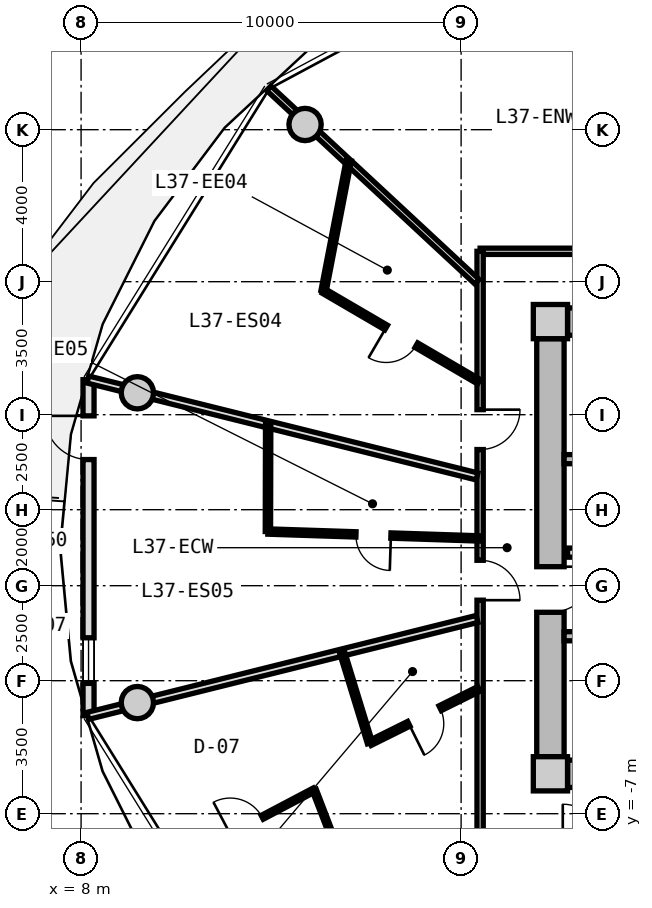
"""IFC4 building model, lengths in metres.
Left out: names, types, materials, properties, quantities, classifications, styles, units other than length and angle.
Written with IfcOpenShell. Run it as: python <this file> out.ifc"""

import sys

from ifc_helpers import new_model, si_unit, direction, frame, frame_2d, origin, origin_2d, place, context, subcontext, project, spatial, rectangle, circle, extrude, source, transform, mapped, element, fill, save


model = new_model("IFC4")
c1 = context("Model", 3, precision=1e-05, world=origin(), true_north=direction((0.0, 1.0)))
c2 = subcontext(c1, "Body", "Model", "MODEL_VIEW")
j1 = project(units=[si_unit("LENGTHUNIT", "METRE"), si_unit("PLANEANGLEUNIT", "RADIAN")], contexts=[c1])
p1 = place(None, origin())
s1 = spatial("IfcSite", under=j1, at=p1, CompositionType="ELEMENT")
p2 = place(p1, origin())
s2 = spatial("IfcBuilding", under=s1, at=p2, CompositionType="ELEMENT")
p3 = place(p2, frame((0.0, 0.0, 120.65)))
s3 = spatial("IfcBuildingStorey", under=s2, at=p3, CompositionType="ELEMENT", Elevation=120.65)
m1 = source(origin(), c2, "Body", "SweptSolid", [
    extrude(rectangle(XDim=0.9, YDim=0.9, at=origin_2d()), origin(), (0.0, 0.0, 1.0), 3.05),
])
for number, where, z_axis, x_axis in (
    (1, (20.35, -5.95, 0.0), (0.0, 0.0, 1.0), (1.0, 0.0, 0.0)),
    (2, (20.35, 5.95, 0.0), (0.0, 0.0, 1.0), (1.0, 0.0, 0.0)),
):
    element("IfcColumn", number, at=place(p3, frame(where, z_axis=z_axis, x_axis=x_axis)), inside=s3, PredefinedType="COLUMN", context=c2, shape_type="MappedRepresentation", body=[
        mapped(m1, transform((0.0, 0.0, 0.0), x_axis=(1.0, 0.0, 0.0), y_axis=(0.0, 1.0, 0.0), z_axis=(0.0, 0.0, 1.0), scale=1.0)),
    ])
m2 = source(origin(), c2, "Body", "SweptSolid", [
    extrude(rectangle(XDim=14.4, YDim=0.72, at=frame_2d((7.2, 0.0))), origin(), (0.0, 0.0, 1.0), 2.79),
])
for number, where, z_axis, x_axis in (
    (3, (20.8, 5.95, 0.0), (0.0, 0.0, 1.0), (1.0, 0.0, 0.0)),
    (4, (35.2, -5.95, 0.0), (0.0, 0.0, 1.0), (-1.0, 0.0, 0.0)),
):
    element("IfcWall", number, at=place(p3, frame(where, z_axis=z_axis, x_axis=x_axis)), inside=s3, PredefinedType="SHEAR", context=c2, shape_type="MappedRepresentation", body=[
        mapped(m2, transform((0.0, 0.0, 0.0), x_axis=(1.0, 0.0, 0.0), y_axis=(0.0, 1.0, 0.0), z_axis=(0.0, 0.0, 1.0), scale=1.0)),
    ])
m3 = source(origin(), c2, "Body", "SweptSolid", [
    extrude(rectangle(XDim=11.0, YDim=0.72, at=frame_2d((5.5, 0.0))), origin(), (0.0, 0.0, 1.0), 2.79),
])
p4 = place(p3, frame((20.35, -5.5, 0.0), z_axis=(0.0, 0.0, 1.0), x_axis=(0.0, 1.0, 0.0)))
e5 = element("IfcWall", 5, at=p4, inside=s3, PredefinedType="SHEAR", context=c2, shape_type="MappedRepresentation", body=[
    mapped(m3, transform((0.0, 0.0, 0.0), x_axis=(1.0, 0.0, 0.0), y_axis=(0.0, 1.0, 0.0), z_axis=(0.0, 0.0, 1.0), scale=1.0)),
])
p5 = place(p4, frame((3.8, 0.0, 0.0)))
e6 = element("IfcOpeningElement", 6, at=p5, cuts=e5, PredefinedType="OPENING", context=c2, shape_type="SweptSolid", body=[
    extrude(rectangle(XDim=1.2, YDim=2.15, at=frame_2d((0.6, 1.075))), frame((0.0, 0.37, 0.0), z_axis=(0.0, -1.0, 0.0), x_axis=(1.0, 0.0, 0.0)), (0.0, 0.0, 1.0), 0.74),
])
m4 = source(origin(), c2, "Body", "SweptSolid", [
    extrude(circle(Radius=0.425, at=origin_2d()), origin(), (0.0, 0.0, 1.0), 3.05),
])
for number, where, z_axis, x_axis in (
    (7, (13.894, 11.137, 0.0), (0.0, 0.0, 1.0), (1.0, 0.0, 0.0)),
    (8, (9.481, 4.076, 0.0), (0.0, 0.0, 1.0), (1.0, 0.0, 0.0)),
    (9, (9.481, -4.076, 0.0), (0.0, 0.0, 1.0), (1.0, 0.0, 0.0)),
):
    element("IfcColumn", number, at=place(p3, frame(where, z_axis=z_axis, x_axis=x_axis)), inside=s3, PredefinedType="COLUMN", context=c2, shape_type="MappedRepresentation", body=[
        mapped(m4, transform((0.0, 0.0, 0.0), x_axis=(1.0, 0.0, 0.0), y_axis=(0.0, 1.0, 0.0), z_axis=(0.0, 0.0, 1.0), scale=1.0)),
    ])
m5 = source(origin(), c2, "Body", "SweptSolid", [
    extrude(rectangle(XDim=8.841, YDim=0.29, at=frame_2d((4.421, 0.0))), origin(), (0.0, 0.0, 1.0), 2.79),
])
p6 = place(p3, frame((8.196, -4.421, 0.0), z_axis=(0.0, 0.0, 1.0), x_axis=(0.0, 1.0, 0.0)))
e10 = element("IfcWall", 10, at=p6, inside=s3, PredefinedType="SOLIDWALL", context=c2, shape_type="MappedRepresentation", body=[
    mapped(m5, transform((0.0, 0.0, 0.0), x_axis=(1.0, 0.0, 0.0), y_axis=(0.0, 1.0, 0.0), z_axis=(0.0, 0.0, 1.0), scale=1.0)),
])
p7 = place(p6, frame((6.74, 0.0, 0.0)))
e11 = element("IfcOpeningElement", 11, at=p7, cuts=e10, PredefinedType="OPENING", context=c2, shape_type="SweptSolid", body=[
    extrude(rectangle(XDim=1.15, YDim=2.25, at=frame_2d((0.575, 1.125))), frame((0.0, 0.155, 0.0), z_axis=(0.0, -1.0, 0.0), x_axis=(1.0, 0.0, 0.0)), (0.0, 0.0, 1.0), 0.31),
])
p8 = place(p6, frame((0.85, 0.0, 0.85)))
e12 = element("IfcOpeningElement", 12, at=p8, cuts=e10, PredefinedType="OPENING", context=c2, shape_type="SweptSolid", body=[
    extrude(rectangle(XDim=1.2, YDim=1.5, at=frame_2d((0.6, 0.75))), frame((0.0, 0.155, 0.0), z_axis=(0.0, -1.0, 0.0), x_axis=(1.0, 0.0, 0.0)), (0.0, 0.0, 1.0), 0.31),
])
m6 = source(origin(), c2, "Body", "SweptSolid", [
    extrude(rectangle(XDim=7.83, YDim=0.24, at=frame_2d((3.915, 0.0))), origin(), (0.0, 0.0, 1.0), 2.79),
])
p9 = place(p3, frame((20.71, 2.33, 0.0), z_axis=(0.0, 0.0, 1.0), x_axis=(1.0, 0.0, 0.0)))
e13 = element("IfcWall", 13, at=p9, inside=s3, PredefinedType="PARTITIONING", context=c2, shape_type="MappedRepresentation", body=[
    mapped(m6, transform((0.0, 0.0, 0.0), x_axis=(1.0, 0.0, 0.0), y_axis=(0.0, 1.0, 0.0), z_axis=(0.0, 0.0, 1.0), scale=1.0)),
])
p10 = place(p3, frame((20.71, -2.33, 0.0), z_axis=(0.0, 0.0, 1.0), x_axis=(1.0, 0.0, 0.0)))
e14 = element("IfcWall", 14, at=p10, inside=s3, PredefinedType="PARTITIONING", context=c2, shape_type="MappedRepresentation", body=[
    mapped(m6, transform((0.0, 0.0, 0.0), x_axis=(1.0, 0.0, 0.0), y_axis=(0.0, 1.0, 0.0), z_axis=(0.0, 0.0, 1.0), scale=1.0)),
])
p11 = place(p10, frame((0.95, 0.0, 0.0)))
e15 = element("IfcOpeningElement", 15, at=p11, cuts=e14, PredefinedType="OPENING", context=c2, shape_type="SweptSolid", body=[
    extrude(rectangle(XDim=1.1, YDim=2.15, at=frame_2d((0.55, 1.075))), frame((0.0, 0.13, 0.0), z_axis=(0.0, -1.0, 0.0), x_axis=(1.0, 0.0, 0.0)), (0.0, 0.0, 1.0), 0.26),
])
m7 = source(origin(), c2, "Body", "SweptSolid", [
    extrude(rectangle(XDim=7.62, YDim=0.24, at=frame_2d((3.81, 0.0))), origin(), (0.0, 0.0, 1.0), 2.775),
])
p12 = place(p3, frame((20.8, -0.13, 0.0), z_axis=(0.0, 0.0, 1.0), x_axis=(1.0, 0.0, 0.0)))
e16 = element("IfcWall", 16, at=p12, inside=s3, PredefinedType="PARTITIONING", context=c2, shape_type="MappedRepresentation", body=[
    mapped(m7, transform((0.0, 0.0, 0.0), x_axis=(1.0, 0.0, 0.0), y_axis=(0.0, 1.0, 0.0), z_axis=(0.0, 0.0, 1.0), scale=1.0)),
])
p13 = place(p12, frame((6.22, 0.0, 0.0)))
e17 = element("IfcOpeningElement", 17, at=p13, cuts=e16, PredefinedType="OPENING", context=c2, shape_type="SweptSolid", body=[
    extrude(rectangle(XDim=1.0, YDim=2.1, at=frame_2d((0.5, 1.05))), frame((0.0, 0.13, 0.0), z_axis=(0.0, -1.0, 0.0), x_axis=(1.0, 0.0, 0.0)), (0.0, 0.0, 1.0), 0.26),
])
p14 = place(p12, frame((2.4, 0.0, 0.0)))
e18 = element("IfcOpeningElement", 18, at=p14, cuts=e16, PredefinedType="OPENING", context=c2, shape_type="SweptSolid", body=[
    extrude(rectangle(XDim=1.0, YDim=2.1, at=frame_2d((0.5, 1.05))), frame((0.0, 0.13, 0.0), z_axis=(0.0, -1.0, 0.0), x_axis=(1.0, 0.0, 0.0)), (0.0, 0.0, 1.0), 0.26),
])
m8 = source(origin(), c2, "Body", "SweptSolid", [
    extrude(rectangle(XDim=8.6, YDim=0.165, at=frame_2d((4.3, 0.0))), origin(), (0.0, 0.0, 1.0), 2.775),
])
p15 = place(p3, frame((18.5, 7.8, 0.0), z_axis=(0.0, 0.0, 1.0), x_axis=(1.0, 0.0, 0.0)))
e19 = element("IfcWall", 19, at=p15, inside=s3, PredefinedType="PARTITIONING", context=c2, shape_type="MappedRepresentation", body=[
    mapped(m8, transform((0.0, 0.0, 0.0), x_axis=(1.0, 0.0, 0.0), y_axis=(0.0, 1.0, 0.0), z_axis=(0.0, 0.0, 1.0), scale=1.0)),
])
p16 = place(p15, frame((3.509, 0.0, 0.0)))
e20 = element("IfcOpeningElement", 20, at=p16, cuts=e19, PredefinedType="OPENING", context=c2, shape_type="SweptSolid", body=[
    extrude(rectangle(XDim=1.05, YDim=2.15, at=frame_2d((0.525, 1.075))), frame((0.0, 0.093, 0.0), z_axis=(0.0, -1.0, 0.0), x_axis=(1.0, 0.0, 0.0)), (0.0, 0.0, 1.0), 0.185),
])
m9 = source(origin(), c2, "Body", "SweptSolid", [
    extrude(rectangle(XDim=15.6, YDim=0.165, at=frame_2d((7.8, 0.0))), origin(), (0.0, 0.0, 1.0), 2.775),
])
p17 = place(p3, frame((18.5, -7.8, 0.0), z_axis=(0.0, 0.0, 1.0), x_axis=(0.0, 1.0, 0.0)))
e21 = element("IfcWall", 21, at=p17, inside=s3, PredefinedType="PARTITIONING", context=c2, shape_type="MappedRepresentation", body=[
    mapped(m9, transform((0.0, 0.0, 0.0), x_axis=(1.0, 0.0, 0.0), y_axis=(0.0, 1.0, 0.0), z_axis=(0.0, 0.0, 1.0), scale=1.0)),
])
p18 = place(p17, frame((10.383, 0.0, 0.0)))
e22 = element("IfcOpeningElement", 22, at=p18, cuts=e21, PredefinedType="OPENING", context=c2, shape_type="SweptSolid", body=[
    extrude(rectangle(XDim=1.05, YDim=2.15, at=frame_2d((0.525, 1.075))), frame((0.0, 0.093, 0.0), z_axis=(0.0, -1.0, 0.0), x_axis=(1.0, 0.0, 0.0)), (0.0, 0.0, 1.0), 0.185),
])
p19 = place(p17, frame((6.419, 0.0, 0.0)))
e23 = element("IfcOpeningElement", 23, at=p19, cuts=e21, PredefinedType="OPENING", context=c2, shape_type="SweptSolid", body=[
    extrude(rectangle(XDim=1.05, YDim=2.15, at=frame_2d((0.525, 1.075))), frame((0.0, 0.093, 0.0), z_axis=(0.0, -1.0, 0.0), x_axis=(1.0, 0.0, 0.0)), (0.0, 0.0, 1.0), 0.185),
])
m10 = source(origin(), c2, "Body", "SweptSolid", [
    extrude(rectangle(XDim=7.482, YDim=0.165, at=frame_2d((3.741, 0.0))), origin(), (0.0, 0.0, 1.0), 2.275),
])
p20 = place(p3, frame((18.42, 6.998, 0.0), z_axis=(0.0, 0.0, 1.0), x_axis=(-0.732508698043, 0.680757671489, 0.0)))
e24 = element("IfcWall", 24, at=p20, inside=s3, PredefinedType="PARTITIONING", context=c2, shape_type="MappedRepresentation", body=[
    mapped(m10, transform((0.0, 0.0, 0.0), x_axis=(1.0, 0.0, 0.0), y_axis=(0.0, 1.0, 0.0), z_axis=(0.0, 0.0, 1.0), scale=1.0)),
])
m11 = source(origin(), c2, "Body", "SweptSolid", [
    extrude(rectangle(XDim=10.556, YDim=0.19, at=frame_2d((5.278, 0.0))), origin(), (0.0, 0.0, 1.0), 2.275),
])
p21 = place(p3, frame((18.42, 1.875, 0.0), z_axis=(0.0, 0.0, 1.0), x_axis=(-0.970363857851, 0.241648470667, 0.0)))
e25 = element("IfcWall", 25, at=p21, inside=s3, PredefinedType="PARTITIONING", context=c2, shape_type="MappedRepresentation", body=[
    mapped(m11, transform((0.0, 0.0, 0.0), x_axis=(1.0, 0.0, 0.0), y_axis=(0.0, 1.0, 0.0), z_axis=(0.0, 0.0, 1.0), scale=1.0)),
])
m12 = source(origin(), c2, "Body", "SweptSolid", [
    extrude(rectangle(XDim=4.735, YDim=0.14, at=frame_2d((2.368, 0.0))), origin(), (0.0, 0.0, 1.0), 2.775),
])
p22 = place(p3, frame((18.47, 4.368, 0.0), z_axis=(0.0, 0.0, 1.0), x_axis=(-0.863537576642, 0.504284496814, 0.0)))
e26 = element("IfcWall", 26, at=p22, inside=s3, PredefinedType="PARTITIONING", context=c2, shape_type="MappedRepresentation", body=[
    mapped(m12, transform((0.0, 0.0, 0.0), x_axis=(1.0, 0.0, 0.0), y_axis=(0.0, 1.0, 0.0), z_axis=(0.0, 0.0, 1.0), scale=1.0)),
])
p23 = place(p22, frame((1.908, 0.0, 0.0)))
e27 = element("IfcOpeningElement", 27, at=p23, cuts=e26, PredefinedType="OPENING", context=c2, shape_type="SweptSolid", body=[
    extrude(rectangle(XDim=0.92, YDim=2.1, at=frame_2d((0.46, 1.05))), frame((0.0, 0.08, 0.0), z_axis=(0.0, -1.0, 0.0), x_axis=(1.0, 0.0, 0.0)), (0.0, 0.0, 1.0), 0.16),
])
m13 = source(origin(), c2, "Body", "SweptSolid", [
    extrude(rectangle(XDim=3.499, YDim=0.14, at=frame_2d((1.75, 0.0))), origin(), (0.0, 0.0, 1.0), 2.775),
])
p24 = place(p3, frame((14.381, 6.756, 0.0), z_axis=(0.0, 0.0, 1.0), x_axis=(0.18957713629, 0.981865830649, 0.0)))
e28 = element("IfcWall", 28, at=p24, inside=s3, PredefinedType="PARTITIONING", context=c2, shape_type="MappedRepresentation", body=[
    mapped(m13, transform((0.0, 0.0, 0.0), x_axis=(1.0, 0.0, 0.0), y_axis=(0.0, 1.0, 0.0), z_axis=(0.0, 0.0, 1.0), scale=1.0)),
])
p25 = place(p3, frame((18.42, -1.875, 0.0), z_axis=(0.0, 0.0, 1.0), x_axis=(-0.970363857851, -0.241648470667, 0.0)))
e29 = element("IfcWall", 29, at=p25, inside=s3, PredefinedType="PARTITIONING", context=c2, shape_type="MappedRepresentation", body=[
    mapped(m11, transform((0.0, 0.0, 0.0), x_axis=(1.0, 0.0, 0.0), y_axis=(0.0, 1.0, 0.0), z_axis=(0.0, 0.0, 1.0), scale=1.0)),
])
m14 = source(origin(), c2, "Body", "SweptSolid", [
    extrude(rectangle(XDim=5.557, YDim=0.14, at=frame_2d((2.778, 0.0))), origin(), (0.0, 0.0, 1.0), 2.775),
])
p26 = place(p3, frame((18.47, 0.244, 0.0), z_axis=(0.0, 0.0, 1.0), x_axis=(-0.999468495627, 0.03259948234, 0.0)))
e30 = element("IfcWall", 30, at=p26, inside=s3, PredefinedType="PARTITIONING", context=c2, shape_type="MappedRepresentation", body=[
    mapped(m14, transform((0.0, 0.0, 0.0), x_axis=(1.0, 0.0, 0.0), y_axis=(0.0, 1.0, 0.0), z_axis=(0.0, 0.0, 1.0), scale=1.0)),
])
p27 = place(p26, frame((2.318, 0.0, 0.0)))
e31 = element("IfcOpeningElement", 31, at=p27, cuts=e30, PredefinedType="OPENING", context=c2, shape_type="SweptSolid", body=[
    extrude(rectangle(XDim=0.92, YDim=2.1, at=frame_2d((0.46, 1.05))), frame((0.0, 0.08, 0.0), z_axis=(0.0, -1.0, 0.0), x_axis=(1.0, 0.0, 0.0)), (0.0, 0.0, 1.0), 0.16),
])
m15 = source(origin(), c2, "Body", "SweptSolid", [
    extrude(rectangle(XDim=2.837, YDim=0.14, at=frame_2d((1.418, 0.0))), origin(), (0.0, 0.0, 1.0), 2.775),
])
p28 = place(p3, frame((12.916, 0.425, 0.0), z_axis=(0.0, 0.0, 1.0), x_axis=(0.002409838945, 0.999997096334, 0.0)))
e32 = element("IfcWall", 32, at=p28, inside=s3, PredefinedType="PARTITIONING", context=c2, shape_type="MappedRepresentation", body=[
    mapped(m15, transform((0.0, 0.0, 0.0), x_axis=(1.0, 0.0, 0.0), y_axis=(0.0, 1.0, 0.0), z_axis=(0.0, 0.0, 1.0), scale=1.0)),
])
m16 = source(origin(), c2, "Body", "SweptSolid", [
    extrude(rectangle(XDim=3.203, YDim=0.14, at=frame_2d((1.601, 0.0))), origin(), (0.0, 0.0, 1.0), 2.775),
])
p29 = place(p3, frame((18.47, -3.717, 0.0), z_axis=(0.0, 0.0, 1.0), x_axis=(-0.895552551978, -0.444955758077, 0.0)))
e33 = element("IfcWall", 33, at=p29, inside=s3, PredefinedType="PARTITIONING", context=c2, shape_type="MappedRepresentation", body=[
    mapped(m16, transform((0.0, 0.0, 0.0), x_axis=(1.0, 0.0, 0.0), y_axis=(0.0, 1.0, 0.0), z_axis=(0.0, 0.0, 1.0), scale=1.0)),
])
p30 = place(p29, frame((1.141, 0.0, 0.0)))
e34 = element("IfcOpeningElement", 34, at=p30, cuts=e33, PredefinedType="OPENING", context=c2, shape_type="SweptSolid", body=[
    extrude(rectangle(XDim=0.92, YDim=2.1, at=frame_2d((0.46, 1.05))), frame((0.0, 0.08, 0.0), z_axis=(0.0, -1.0, 0.0), x_axis=(1.0, 0.0, 0.0)), (0.0, 0.0, 1.0), 0.16),
])
m17 = source(origin(), c2, "Body", "SweptSolid", [
    extrude(rectangle(XDim=2.478, YDim=0.14, at=frame_2d((1.239, 0.0))), origin(), (0.0, 0.0, 1.0), 2.775),
])
p31 = place(p3, frame((15.602, -5.142, 0.0), z_axis=(0.0, 0.0, 1.0), x_axis=(-0.293372504398, 0.955998207981, 0.0)))
e35 = element("IfcWall", 35, at=p31, inside=s3, PredefinedType="PARTITIONING", context=c2, shape_type="MappedRepresentation", body=[
    mapped(m17, transform((0.0, 0.0, 0.0), x_axis=(1.0, 0.0, 0.0), y_axis=(0.0, 1.0, 0.0), z_axis=(0.0, 0.0, 1.0), scale=1.0)),
])
m18 = source(origin(), c2, "Body", "SweptSolid", [
    extrude(rectangle(XDim=4.042, YDim=0.115, at=frame_2d((2.021, 0.0))), origin(), (0.0, 0.0, 1.0), 2.775),
])
p32 = place(p3, frame((14.134, -6.375, 0.0), z_axis=(0.0, 0.0, 1.0), x_axis=(-0.88476748851, -0.466032714812, 0.0)))
e36 = element("IfcWall", 36, at=p32, inside=s3, PredefinedType="PARTITIONING", context=c2, shape_type="MappedRepresentation", body=[
    mapped(m18, transform((0.0, 0.0, 0.0), x_axis=(1.0, 0.0, 0.0), y_axis=(0.0, 1.0, 0.0), z_axis=(0.0, 0.0, 1.0), scale=1.0)),
])
p33 = place(p32, frame((1.546, 0.0, 0.0)))
e37 = element("IfcOpeningElement", 37, at=p33, cuts=e36, PredefinedType="OPENING", context=c2, shape_type="SweptSolid", body=[
    extrude(rectangle(XDim=0.95, YDim=2.1, at=frame_2d((0.475, 1.05))), frame((0.0, 0.067, 0.0), z_axis=(0.0, -1.0, 0.0), x_axis=(1.0, 0.0, 0.0)), (0.0, 0.0, 1.0), 0.135),
])
m19 = source(origin(), c2, "Body", "SweptSolid", [
    extrude(rectangle(XDim=3.677, YDim=0.115, at=frame_2d((1.838, 0.0))), origin(), (0.0, 0.0, 1.0), 2.775),
])
p34 = place(p3, frame((14.134, -6.375, 0.0), z_axis=(0.0, 0.0, 1.0), x_axis=(0.359592980271, -0.933109258629, 0.0)))
e38 = element("IfcWall", 38, at=p34, inside=s3, PredefinedType="PARTITIONING", context=c2, shape_type="MappedRepresentation", body=[
    mapped(m19, transform((0.0, 0.0, 0.0), x_axis=(1.0, 0.0, 0.0), y_axis=(0.0, 1.0, 0.0), z_axis=(0.0, 0.0, 1.0), scale=1.0)),
])
m20 = source(origin(), c2, "Body", "SweptSolid", [
    extrude(rectangle(XDim=1.15, YDim=2.25, at=frame_2d((0.575, 1.125))), frame((0.0, 0.025, 0.0), z_axis=(0.0, -1.0, 0.0), x_axis=(1.0, 0.0, 0.0)), (0.0, 0.0, 1.0), 0.05),
])
p35 = place(p7, origin())
e39 = element("IfcDoor", 39, at=p35, inside=s3, OperationType="SINGLE_SWING_RIGHT", PredefinedType="DOOR", context=c2, shape_type="MappedRepresentation", body=[
    mapped(m20, transform((0.0, 0.0, 0.0), x_axis=(1.0, 0.0, 0.0), y_axis=(0.0, 1.0, 0.0), z_axis=(0.0, 0.0, 1.0), scale=1.0)),
])
fill(e11, e39)
m21 = source(origin(), c2, "Body", "SweptSolid", [
    extrude(rectangle(XDim=1.2, YDim=1.5, at=frame_2d((0.6, 0.75))), frame((0.0, 0.03, 0.0), z_axis=(0.0, -1.0, 0.0), x_axis=(1.0, 0.0, 0.0)), (0.0, 0.0, 1.0), 0.06),
])
p36 = place(p8, origin())
e40 = element("IfcWindow", 40, at=p36, inside=s3, PartitioningType="SINGLE_PANEL", PredefinedType="WINDOW", context=c2, shape_type="MappedRepresentation", body=[
    mapped(m21, transform((0.0, 0.0, 0.0), x_axis=(1.0, 0.0, 0.0), y_axis=(0.0, 1.0, 0.0), z_axis=(0.0, 0.0, 1.0), scale=1.0)),
])
fill(e12, e40)
m22 = source(origin(), c2, "Body", "SweptSolid", [
    extrude(rectangle(XDim=1.2, YDim=2.15, at=frame_2d((0.6, 1.075))), frame((0.0, 0.025, 0.0), z_axis=(0.0, -1.0, 0.0), x_axis=(1.0, 0.0, 0.0)), (0.0, 0.0, 1.0), 0.05),
])
p37 = place(p5, frame((1.2, 0.0, 0.0), z_axis=(0.0, 0.0, 1.0), x_axis=(-1.0, 0.0, 0.0)))
e41 = element("IfcDoor", 41, at=p37, inside=s3, OperationType="SINGLE_SWING_LEFT", PredefinedType="DOOR", context=c2, shape_type="MappedRepresentation", body=[
    mapped(m22, transform((0.0, 0.0, 0.0), x_axis=(1.0, 0.0, 0.0), y_axis=(0.0, 1.0, 0.0), z_axis=(0.0, 0.0, 1.0), scale=1.0)),
])
fill(e6, e41)
m23 = source(origin(), c2, "Body", "SweptSolid", [
    extrude(rectangle(XDim=1.05, YDim=2.15, at=frame_2d((0.525, 1.075))), frame((0.0, 0.025, 0.0), z_axis=(0.0, -1.0, 0.0), x_axis=(1.0, 0.0, 0.0)), (0.0, 0.0, 1.0), 0.05),
])
p38 = place(p18, frame((1.05, 0.0, 0.0), z_axis=(0.0, 0.0, 1.0), x_axis=(-1.0, 0.0, 0.0)))
e42 = element("IfcDoor", 42, at=p38, inside=s3, OperationType="SINGLE_SWING_LEFT", PredefinedType="DOOR", context=c2, shape_type="MappedRepresentation", body=[
    mapped(m23, transform((0.0, 0.0, 0.0), x_axis=(1.0, 0.0, 0.0), y_axis=(0.0, 1.0, 0.0), z_axis=(0.0, 0.0, 1.0), scale=1.0)),
])
fill(e22, e42)
m24 = source(origin(), c2, "Body", "SweptSolid", [
    extrude(rectangle(XDim=0.92, YDim=2.1, at=frame_2d((0.46, 1.05))), frame((0.0, 0.025, 0.0), z_axis=(0.0, -1.0, 0.0), x_axis=(1.0, 0.0, 0.0)), (0.0, 0.0, 1.0), 0.05),
])
p39 = place(p23, origin())
e43 = element("IfcDoor", 43, at=p39, inside=s3, OperationType="SINGLE_SWING_RIGHT", PredefinedType="DOOR", context=c2, shape_type="MappedRepresentation", body=[
    mapped(m24, transform((0.0, 0.0, 0.0), x_axis=(1.0, 0.0, 0.0), y_axis=(0.0, 1.0, 0.0), z_axis=(0.0, 0.0, 1.0), scale=1.0)),
])
fill(e27, e43)
p40 = place(p19, frame((1.05, 0.0, 0.0), z_axis=(0.0, 0.0, 1.0), x_axis=(-1.0, 0.0, 0.0)))
e44 = element("IfcDoor", 44, at=p40, inside=s3, OperationType="SINGLE_SWING_RIGHT", PredefinedType="DOOR", context=c2, shape_type="MappedRepresentation", body=[
    mapped(m23, transform((0.0, 0.0, 0.0), x_axis=(1.0, 0.0, 0.0), y_axis=(0.0, 1.0, 0.0), z_axis=(0.0, 0.0, 1.0), scale=1.0)),
])
fill(e23, e44)
p41 = place(p27, origin())
e45 = element("IfcDoor", 45, at=p41, inside=s3, OperationType="SINGLE_SWING_LEFT", PredefinedType="DOOR", context=c2, shape_type="MappedRepresentation", body=[
    mapped(m24, transform((0.0, 0.0, 0.0), x_axis=(1.0, 0.0, 0.0), y_axis=(0.0, 1.0, 0.0), z_axis=(0.0, 0.0, 1.0), scale=1.0)),
])
fill(e31, e45)
p42 = place(p30, origin())
e46 = element("IfcDoor", 46, at=p42, inside=s3, OperationType="SINGLE_SWING_RIGHT", PredefinedType="DOOR", context=c2, shape_type="MappedRepresentation", body=[
    mapped(m24, transform((0.0, 0.0, 0.0), x_axis=(1.0, 0.0, 0.0), y_axis=(0.0, 1.0, 0.0), z_axis=(0.0, 0.0, 1.0), scale=1.0)),
])
fill(e34, e46)
m25 = source(origin(), c2, "Body", "SweptSolid", [
    extrude(rectangle(XDim=0.95, YDim=2.1, at=frame_2d((0.475, 1.05))), frame((0.0, 0.025, 0.0), z_axis=(0.0, -1.0, 0.0), x_axis=(1.0, 0.0, 0.0)), (0.0, 0.0, 1.0), 0.05),
])
p43 = place(p33, frame((0.95, 0.0, 0.0), z_axis=(0.0, 0.0, 1.0), x_axis=(-1.0, 0.0, 0.0)))
e47 = element("IfcDoor", 47, at=p43, inside=s3, OperationType="SINGLE_SWING_LEFT", PredefinedType="DOOR", context=c2, shape_type="MappedRepresentation", body=[
    mapped(m25, transform((0.0, 0.0, 0.0), x_axis=(1.0, 0.0, 0.0), y_axis=(0.0, 1.0, 0.0), z_axis=(0.0, 0.0, 1.0), scale=1.0)),
])
fill(e37, e47)
save(model, sys.argv[1])
